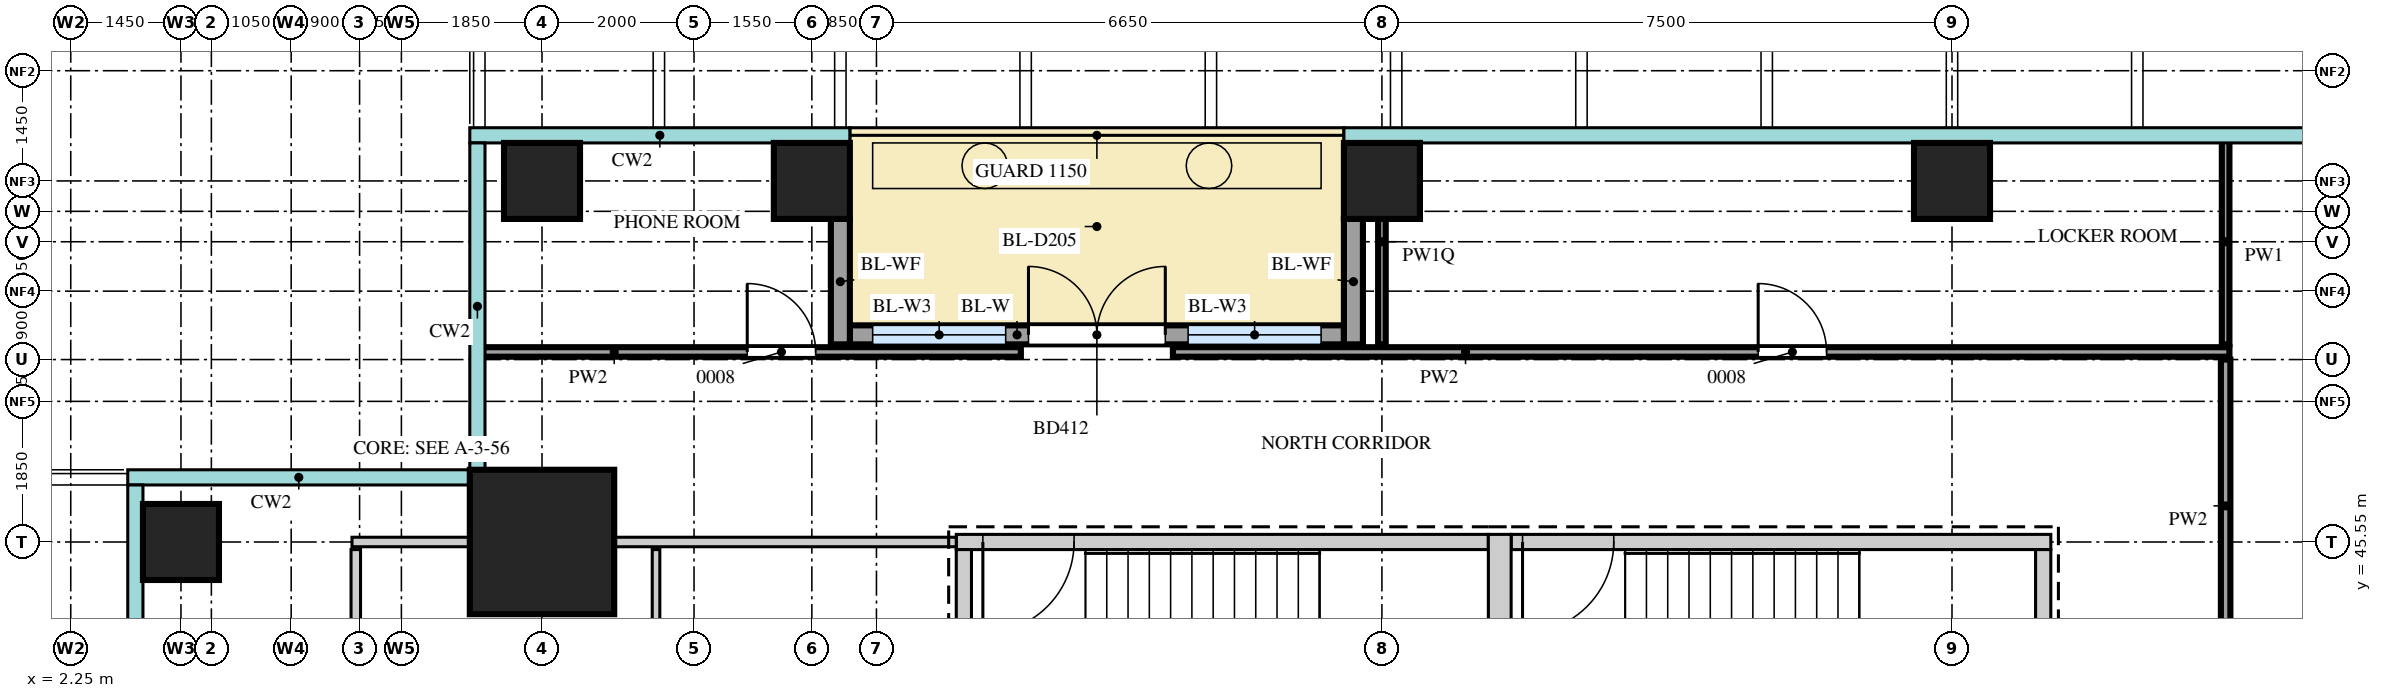
"""IFC4 building model, lengths in metres.
Left out: names, types, materials, properties, quantities, classifications, styles, units other than length and angle.
Written with IfcOpenShell. Run it as: python <this file> out.ifc"""

import sys

from ifc_helpers import new_model, si_unit, direction, frame, frame_2d, origin, origin_2d, place, context, subcontext, project, spatial, rectangle, extrude, source, transform, mapped, element, fill, save


model = new_model("IFC4")
c1 = context("Model", 3, precision=1e-05, world=origin(), true_north=direction((0.0, 1.0)))
c2 = subcontext(c1, "Body", "Model", "MODEL_VIEW")
j1 = project(units=[si_unit("LENGTHUNIT", "METRE"), si_unit("PLANEANGLEUNIT", "RADIAN")], contexts=[c1])
p1 = place(None, origin())
s1 = spatial("IfcSite", under=j1, at=p1, CompositionType="ELEMENT")
p2 = place(p1, origin())
s2 = spatial("IfcBuilding", under=s1, at=p2, CompositionType="ELEMENT")
p3 = place(p2, frame((0.0, 0.0, 188.7)))
s3 = spatial("IfcBuildingStorey", under=s2, at=p3, CompositionType="ELEMENT", Elevation=188.7)
m1 = source(origin(), c2, "Body", "SweptSolid", [
    extrude(rectangle(XDim=7.0, YDim=0.2, at=frame_2d((3.5, 0.0))), origin(), (0.0, 0.0, 1.0), 3.75),
])
p4 = place(p3, frame((13.9, 45.55, 0.0), z_axis=(0.0, 0.0, 1.0), x_axis=(1.0, 0.0, 0.0)))
e1 = element("IfcWall", 1, at=p4, inside=s3, PredefinedType="SHEAR", context=c2, shape_type="MappedRepresentation", body=[
    mapped(m1, transform((0.0, 0.0, 0.0))),
])
m2 = source(origin(), c2, "Body", "SweptSolid", [
    extrude(rectangle(XDim=1.2, YDim=2.1, at=frame_2d((0.6, 1.05))), frame((0.0, 0.11, 0.0), z_axis=(0.0, -1.0, 0.0), x_axis=(1.0, 0.0, 0.0)), (0.0, 0.0, 1.0), 0.22),
])
p5 = place(p4, frame((0.35, 0.0, 0.0)))
e2 = element("IfcOpeningElement", 2, at=p5, cuts=e1, PredefinedType="OPENING", context=c2, shape_type="MappedRepresentation", body=[
    mapped(m2, transform((0.0, 0.0, 0.0))),
])
m3 = source(origin(), c2, "Body", "SweptSolid", [
    extrude(rectangle(XDim=7.1, YDim=0.2, at=frame_2d((3.55, 0.0))), origin(), (0.0, 0.0, 1.0), 3.75),
])
p6 = place(p3, frame((21.2, 45.55, 0.0), z_axis=(0.0, 0.0, 1.0), x_axis=(1.0, 0.0, 0.0)))
e3 = element("IfcWall", 3, at=p6, inside=s3, PredefinedType="SHEAR", context=c2, shape_type="MappedRepresentation", body=[
    mapped(m3, transform((0.0, 0.0, 0.0))),
])
p7 = place(p6, frame((0.15, 0.0, 0.0)))
e4 = element("IfcOpeningElement", 4, at=p7, cuts=e3, PredefinedType="OPENING", context=c2, shape_type="MappedRepresentation", body=[
    mapped(m2, transform((0.0, 0.0, 0.0))),
])
m4 = source(origin(), c2, "Body", "SweptSolid", [
    extrude(rectangle(XDim=3.75, YDim=0.3, at=frame_2d((1.875, 0.0))), origin(), (0.0, 0.0, 1.0), 3.75),
])
p8 = place(p3, frame((21.05, 41.9, 0.0), z_axis=(0.0, 0.0, 1.0), x_axis=(0.0, 1.0, 0.0)))
e5 = element("IfcWall", 5, at=p8, inside=s3, PredefinedType="SHEAR", context=c2, shape_type="MappedRepresentation", body=[
    mapped(m4, transform((0.0, 0.0, 0.0))),
])
m5 = source(origin(), c2, "Body", "SweptSolid", [
    extrude(rectangle(XDim=3.35, YDim=0.2, at=frame_2d((1.675, 0.0))), origin(), (0.0, 0.0, 1.0), 3.75),
])
for number, where, z_axis, x_axis in (
    (6, (14.0, 42.1, 0.0), (0.0, 0.0, 1.0), (0.0, 1.0, 0.0)),
    (7, (28.2, 42.1, 0.0), (0.0, 0.0, 1.0), (0.0, 1.0, 0.0)),
):
    element("IfcWall", number, at=place(p3, frame(where, z_axis=z_axis, x_axis=x_axis)), inside=s3, PredefinedType="SHEAR", context=c2, shape_type="MappedRepresentation", body=[
        mapped(m5, transform((0.0, 0.0, 0.0))),
    ])
m6 = source(origin(), c2, "Body", "SweptSolid", [
    extrude(rectangle(XDim=1.9, YDim=1.9, at=origin_2d()), origin(), (0.0, 0.0, 1.0), 4.0),
])
p9 = place(p3, frame((8.45, 45.55, 0.0), z_axis=(0.0, 0.0, 1.0), x_axis=(1.0, 0.0, 0.0)))
e8 = element("IfcColumn", 8, at=p9, inside=s3, PredefinedType="COLUMN", context=c2, shape_type="MappedRepresentation", body=[
    mapped(m6, transform((0.0, 0.0, 0.0))),
])
m7 = source(origin(), c2, "Body", "SweptSolid", [
    extrude(rectangle(XDim=1.0, YDim=1.0, at=origin_2d()), origin(), (0.0, 0.0, 1.0), 3.75),
])
for number, where, z_axis, x_axis in (
    (9, (8.45, 50.3, 0.0), (0.0, 0.0, 1.0), (1.0, 0.0, 0.0)),
    (10, (12.0, 50.3, 0.0), (0.0, 0.0, 1.0), (1.0, 0.0, 0.0)),
    (11, (19.5, 50.3, 0.0), (0.0, 0.0, 1.0), (1.0, 0.0, 0.0)),
    (12, (27.0, 50.3, 0.0), (0.0, 0.0, 1.0), (1.0, 0.0, 0.0)),
    (13, (3.7, 45.55, 0.0), (0.0, 0.0, 1.0), (1.0, 0.0, 0.0)),
):
    element("IfcColumn", number, at=place(p3, frame(where, z_axis=z_axis, x_axis=x_axis)), inside=s3, PredefinedType="COLUMN", context=c2, shape_type="MappedRepresentation", body=[
        mapped(m7, transform((0.0, 0.0, 0.0))),
    ])
m8 = source(origin(), c2, "Body", "SweptSolid", [
    extrude(rectangle(XDim=6.5, YDim=0.25, at=frame_2d((3.25, 0.0))), origin(), (0.0, 0.0, 1.0), 3.75),
])
p10 = place(p3, frame((12.5, 48.275, 0.0), z_axis=(0.0, 0.0, 1.0), x_axis=(1.0, 0.0, 0.0)))
e14 = element("IfcWall", 14, at=p10, inside=s3, PredefinedType="SOLIDWALL", context=c2, shape_type="MappedRepresentation", body=[
    mapped(m8, transform((0.0, 0.0, 0.0))),
])
m9 = source(origin(), c2, "Body", "SweptSolid", [
    extrude(rectangle(XDim=1.75, YDim=2.4, at=frame_2d((0.875, 1.2))), frame((0.0, 0.135, 0.0), z_axis=(0.0, -1.0, 0.0), x_axis=(1.0, 0.0, 0.0)), (0.0, 0.0, 1.0), 0.27),
])
p11 = place(p10, frame((0.3, 0.0, 0.0)))
e15 = element("IfcOpeningElement", 15, at=p11, cuts=e14, PredefinedType="OPENING", context=c2, shape_type="MappedRepresentation", body=[
    mapped(m9, transform((0.0, 0.0, 0.0))),
])
p12 = place(p10, frame((4.45, 0.0, 0.0)))
e16 = element("IfcOpeningElement", 16, at=p12, cuts=e14, PredefinedType="OPENING", context=c2, shape_type="MappedRepresentation", body=[
    mapped(m9, transform((0.0, 0.0, 0.0))),
])
m10 = source(origin(), c2, "Body", "SweptSolid", [
    extrude(rectangle(XDim=1.8, YDim=2.4, at=frame_2d((0.9, 1.2))), frame((0.0, 0.135, 0.0), z_axis=(0.0, -1.0, 0.0), x_axis=(1.0, 0.0, 0.0)), (0.0, 0.0, 1.0), 0.27),
])
p13 = place(p10, frame((2.35, 0.0, 0.0)))
e17 = element("IfcOpeningElement", 17, at=p13, cuts=e14, PredefinedType="OPENING", context=c2, shape_type="MappedRepresentation", body=[
    mapped(m10, transform((0.0, 0.0, 0.0))),
])
m11 = source(origin(), c2, "Body", "SweptSolid", [
    extrude(rectangle(XDim=1.65, YDim=0.25, at=frame_2d((0.825, 0.0))), origin(), (0.0, 0.0, 1.0), 3.45),
])
for number, where, z_axis, x_axis in (
    (18, (12.375, 49.8, 0.0), (0.0, 0.0, 1.0), (0.0, -1.0, 0.0)),
    (19, (19.125, 49.8, 0.0), (0.0, 0.0, 1.0), (0.0, -1.0, 0.0)),
):
    element("IfcWall", number, at=place(p3, frame(where, z_axis=z_axis, x_axis=x_axis)), inside=s3, PredefinedType="SOLIDWALL", context=c2, shape_type="MappedRepresentation", body=[
        mapped(m11, transform((0.0, 0.0, 0.0))),
    ])
m12 = source(origin(), c2, "Body", "SweptSolid", [
    extrude(rectangle(XDim=3.45, YDim=0.125, at=frame_2d((1.725, 0.0))), origin(), (0.0, 0.0, 1.0), 3.8),
])
p14 = place(p3, frame((6.0, 42.0, 0.0), z_axis=(0.0, 0.0, 1.0), x_axis=(0.0, 1.0, 0.0)))
e20 = element("IfcWall", 20, at=p14, inside=s3, PredefinedType="PARTITIONING", context=c2, shape_type="MappedRepresentation", body=[
    mapped(m12, transform((0.0, 0.0, 0.0))),
])
m13 = source(origin(), c2, "Body", "SweptSolid", [
    extrude(rectangle(XDim=3.45, YDim=0.1, at=frame_2d((1.725, 0.0))), origin(), (0.0, 0.0, 1.0), 3.8),
])
p15 = place(p3, frame((9.95, 42.0, 0.0), z_axis=(0.0, 0.0, 1.0), x_axis=(0.0, 1.0, 0.0)))
e21 = element("IfcWall", 21, at=p15, inside=s3, PredefinedType="PARTITIONING", context=c2, shape_type="MappedRepresentation", body=[
    mapped(m13, transform((0.0, 0.0, 0.0))),
])
m14 = source(origin(), c2, "Body", "SweptSolid", [
    extrude(rectangle(XDim=3.85, YDim=0.125, at=frame_2d((1.925, 0.0))), origin(), (0.0, 0.0, 1.0), 3.8),
])
p16 = place(p3, frame((30.6, 44.1, 0.0), z_axis=(0.0, 0.0, 1.0), x_axis=(0.0, 1.0, 0.0)))
e22 = element("IfcWall", 22, at=p16, inside=s3, PredefinedType="PARTITIONING", context=c2, shape_type="MappedRepresentation", body=[
    mapped(m14, transform((0.0, 0.0, 0.0))),
])
m15 = source(origin(), c2, "Body", "SweptSolid", [
    extrude(rectangle(XDim=7.95, YDim=0.125, at=frame_2d((3.975, 0.0))), origin(), (0.0, 0.0, 1.0), 3.25),
])
p17 = place(p3, frame((5.95, 45.55, 0.0), z_axis=(0.0, 0.0, 1.0), x_axis=(1.0, 0.0, 0.0)))
e23 = element("IfcWall", 23, at=p17, inside=s3, PredefinedType="PARTITIONING", context=c2, shape_type="MappedRepresentation", body=[
    mapped(m15, transform((0.0, 0.0, 0.0))),
])
m16 = source(origin(), c2, "Body", "SweptSolid", [
    extrude(rectangle(XDim=2.7, YDim=0.1, at=frame_2d((1.35, 0.0))), origin(), (0.0, 0.0, 1.0), 3.42),
])
p18 = place(p3, frame((19.5, 48.15, 0.0), z_axis=(0.0, 0.0, 1.0), x_axis=(0.0, 1.0, 0.0)))
e24 = element("IfcWall", 24, at=p18, inside=s3, PredefinedType="PARTITIONING", context=c2, shape_type="MappedRepresentation", body=[
    mapped(m16, transform((0.0, 0.0, 0.0))),
])
m17 = source(origin(), c2, "Body", "SweptSolid", [
    extrude(rectangle(XDim=2.7, YDim=0.1, at=frame_2d((1.35, 0.0))), origin(), (0.0, 0.0, 1.0), 3.8),
])
p19 = place(p3, frame((30.6, 48.15, 0.0), z_axis=(0.0, 0.0, 1.0), x_axis=(0.0, 1.0, 0.0)))
e25 = element("IfcWall", 25, at=p19, inside=s3, PredefinedType="PARTITIONING", context=c2, shape_type="MappedRepresentation", body=[
    mapped(m17, transform((0.0, 0.0, 0.0))),
])
m18 = source(origin(), c2, "Body", "SweptSolid", [
    extrude(rectangle(XDim=7.1, YDim=0.125, at=frame_2d((3.55, 0.0))), origin(), (0.0, 0.0, 1.0), 3.8),
])
p20 = place(p3, frame((7.65, 48.05, 0.0), z_axis=(0.0, 0.0, 1.0), x_axis=(1.0, 0.0, 0.0)))
e26 = element("IfcWall", 26, at=p20, inside=s3, PredefinedType="PARTITIONING", context=c2, shape_type="MappedRepresentation", body=[
    mapped(m18, transform((0.0, 0.0, 0.0))),
])
m19 = source(origin(), c2, "Body", "SweptSolid", [
    extrude(rectangle(XDim=0.9, YDim=2.1, at=frame_2d((0.45, 1.05))), frame((0.0, 0.073, 0.0), z_axis=(0.0, -1.0, 0.0), x_axis=(1.0, 0.0, 0.0)), (0.0, 0.0, 1.0), 0.145),
])
p21 = place(p20, frame((3.5, 0.0, 0.0)))
e27 = element("IfcOpeningElement", 27, at=p21, cuts=e26, PredefinedType="OPENING", context=c2, shape_type="MappedRepresentation", body=[
    mapped(m19, transform((0.0, 0.0, 0.0))),
])
m20 = source(origin(), c2, "Body", "SweptSolid", [
    extrude(rectangle(XDim=13.9, YDim=0.125, at=frame_2d((6.95, 0.0))), origin(), (0.0, 0.0, 1.0), 3.8),
])
p22 = place(p3, frame((16.75, 48.05, 0.0), z_axis=(0.0, 0.0, 1.0), x_axis=(1.0, 0.0, 0.0)))
e28 = element("IfcWall", 28, at=p22, inside=s3, PredefinedType="PARTITIONING", context=c2, shape_type="MappedRepresentation", body=[
    mapped(m20, transform((0.0, 0.0, 0.0))),
])
p23 = place(p22, frame((7.7, 0.0, 0.0)))
e29 = element("IfcOpeningElement", 29, at=p23, cuts=e28, PredefinedType="OPENING", context=c2, shape_type="MappedRepresentation", body=[
    mapped(m19, transform((0.0, 0.0, 0.0))),
])
m21 = source(origin(), c2, "Body", "SweptSolid", [
    extrude(rectangle(XDim=1.75, YDim=2.4, at=frame_2d((0.875, 1.2))), frame((0.0, 0.03, 0.0), z_axis=(0.0, -1.0, 0.0), x_axis=(1.0, 0.0, 0.0)), (0.0, 0.0, 1.0), 0.06),
])
p24 = place(p11, origin())
e30 = element("IfcWindow", 30, at=p24, inside=s3, PartitioningType="SINGLE_PANEL", PredefinedType="WINDOW", context=c2, shape_type="MappedRepresentation", body=[
    mapped(m21, transform((0.0, 0.0, 0.0))),
])
fill(e15, e30)
p25 = place(p12, origin())
e31 = element("IfcWindow", 31, at=p25, inside=s3, PartitioningType="SINGLE_PANEL", PredefinedType="WINDOW", context=c2, shape_type="MappedRepresentation", body=[
    mapped(m21, transform((0.0, 0.0, 0.0))),
])
fill(e16, e31)
m22 = source(origin(), c2, "Body", "SweptSolid", [
    extrude(rectangle(XDim=1.8, YDim=2.4, at=frame_2d((0.9, 1.2))), frame((0.0, 0.025, 0.0), z_axis=(0.0, -1.0, 0.0), x_axis=(1.0, 0.0, 0.0)), (0.0, 0.0, 1.0), 0.05),
])
p26 = place(p13, origin())
e32 = element("IfcDoor", 32, at=p26, inside=s3, OperationType="DOUBLE_DOOR_DOUBLE_SWING", PredefinedType="DOOR", context=c2, shape_type="MappedRepresentation", body=[
    mapped(m22, transform((0.0, 0.0, 0.0))),
])
fill(e17, e32)
m23 = source(origin(), c2, "Body", "SweptSolid", [
    extrude(rectangle(XDim=0.9, YDim=2.1, at=frame_2d((0.45, 1.05))), frame((0.0, 0.025, 0.0), z_axis=(0.0, -1.0, 0.0), x_axis=(1.0, 0.0, 0.0)), (0.0, 0.0, 1.0), 0.05),
])
p27 = place(p21, origin())
e33 = element("IfcDoor", 33, at=p27, inside=s3, OperationType="SINGLE_SWING_RIGHT", PredefinedType="DOOR", context=c2, shape_type="MappedRepresentation", body=[
    mapped(m23, transform((0.0, 0.0, 0.0))),
])
fill(e27, e33)
p28 = place(p23, origin())
e34 = element("IfcDoor", 34, at=p28, inside=s3, OperationType="SINGLE_SWING_RIGHT", PredefinedType="DOOR", context=c2, shape_type="MappedRepresentation", body=[
    mapped(m23, transform((0.0, 0.0, 0.0))),
])
fill(e29, e34)
m24 = source(origin(), c2, "Body", "SweptSolid", [
    extrude(rectangle(XDim=1.2, YDim=2.1, at=frame_2d((0.6, 1.05))), frame((0.0, 0.025, 0.0), z_axis=(0.0, -1.0, 0.0), x_axis=(1.0, 0.0, 0.0)), (0.0, 0.0, 1.0), 0.05),
])
p29 = place(p5, origin())
e35 = element("IfcDoor", 35, at=p29, inside=s3, OperationType="SINGLE_SWING_LEFT", PredefinedType="DOOR", context=c2, shape_type="MappedRepresentation", body=[
    mapped(m24, transform((0.0, 0.0, 0.0))),
])
fill(e2, e35)
p30 = place(p7, origin())
e36 = element("IfcDoor", 36, at=p30, inside=s3, OperationType="SINGLE_SWING_LEFT", PredefinedType="DOOR", context=c2, shape_type="MappedRepresentation", body=[
    mapped(m24, transform((0.0, 0.0, 0.0))),
])
fill(e4, e36)
save(model, sys.argv[1])
